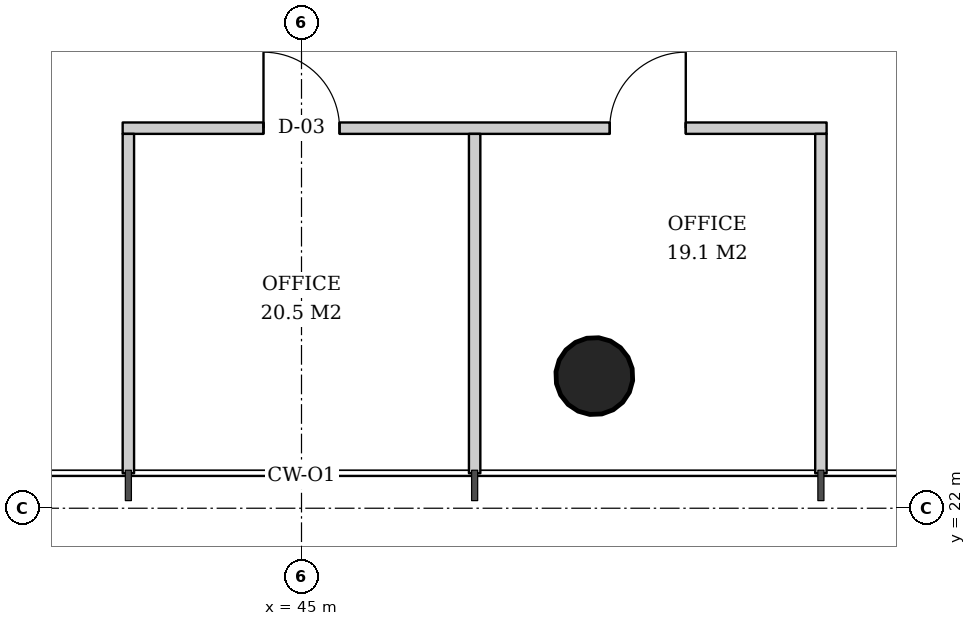
"""IFC4 building model, lengths in metres.
Left out: names, types, materials, properties, quantities, classifications, styles, units other than length and angle.
Written with IfcOpenShell. Run it as: python <this file> out.ifc"""

import sys

from ifc_helpers import new_model, si_unit, direction, frame, frame_2d, origin, origin_2d, place, context, subcontext, project, spatial, rectangle, hollow_circle, extrude, element, fill, save


model = new_model("IFC4")
c1 = context("Model", 3, precision=1e-05, world=origin(), true_north=direction((0.0, 1.0)))
c2 = subcontext(c1, "Body", "Model", "MODEL_VIEW")
j1 = project(units=[si_unit("LENGTHUNIT", "METRE"), si_unit("PLANEANGLEUNIT", "RADIAN")], contexts=[c1])
p1 = place(None, origin())
s1 = spatial("IfcSite", under=j1, at=p1, CompositionType="ELEMENT")
p2 = place(p1, origin())
s2 = spatial("IfcBuilding", under=s1, at=p2, CompositionType="ELEMENT")
p3 = place(p2, frame((0.0, 0.0, 74.2)))
s3 = spatial("IfcBuildingStorey", under=s2, at=p3, CompositionType="ELEMENT", Elevation=74.2)
p4 = place(p3, frame((48.86, 23.7, 0.0), z_axis=(-0.006421252497, 0.031977837436, 0.999467951177), x_axis=(-0.980428942348, -0.196873281596, 0.0)))
e1 = element("IfcColumn", 1, at=p4, inside=s3, PredefinedType="COLUMN", context=c2, shape_type="SweptSolid", body=[
    extrude(hollow_circle(Radius=0.508, WallThickness=0.04, at=origin_2d()), origin(), (0.0, 0.0, 1.0), 3.802),
])
p5 = place(p3, frame((42.647, 27.0, 0.0), z_axis=(0.0, 0.0, 1.0), x_axis=(1.0, 0.0, 0.0)))
e2 = element("IfcWall", 2, at=p5, inside=s3, PredefinedType="PARTITIONING", context=c2, shape_type="SweptSolid", body=[
    extrude(rectangle(XDim=9.261, YDim=0.15, at=frame_2d((4.631, 0.0))), origin(), (0.0, 0.0, 1.0), 2.85),
])
p6 = place(p5, frame((1.853, 0.0, 0.0)))
e3 = element("IfcOpeningElement", 3, at=p6, cuts=e2, PredefinedType="OPENING", context=c2, shape_type="SweptSolid", body=[
    extrude(rectangle(XDim=1.0, YDim=2.1, at=frame_2d((0.5, 1.05))), frame((0.0, 0.085, 0.0), z_axis=(0.0, -1.0, 0.0), x_axis=(1.0, 0.0, 0.0)), (0.0, 0.0, 1.0), 0.17),
])
p7 = place(p5, frame((6.408, 0.0, 0.0)))
e4 = element("IfcOpeningElement", 4, at=p7, cuts=e2, PredefinedType="OPENING", context=c2, shape_type="SweptSolid", body=[
    extrude(rectangle(XDim=1.0, YDim=2.1, at=frame_2d((0.5, 1.05))), frame((0.0, 0.085, 0.0), z_axis=(0.0, -1.0, 0.0), x_axis=(1.0, 0.0, 0.0)), (0.0, 0.0, 1.0), 0.17),
])
for number, where, z_axis, x_axis in (
    (5, (42.722, 26.925, 0.0), (0.0, 0.0, 1.0), (0.0, -1.0, 0.0)),
    (6, (47.278, 26.925, 0.0), (0.0, 0.0, 1.0), (0.0, -1.0, 0.0)),
    (7, (51.833, 26.925, 0.0), (0.0, 0.0, 1.0), (0.0, -1.0, 0.0)),
):
    element("IfcWall", number, at=place(p3, frame(where, z_axis=z_axis, x_axis=x_axis)), inside=s3, PredefinedType="PARTITIONING", context=c2, shape_type="SweptSolid", body=[
        extrude(rectangle(XDim=4.465, YDim=0.15, at=frame_2d((2.232, 0.0))), origin(), (0.0, 0.0, 1.0), 3.02),
    ])
p8 = place(p6, origin())
e8 = element("IfcDoor", 8, at=p8, inside=s3, OperationType="SINGLE_SWING_LEFT", PredefinedType="DOOR", context=c2, shape_type="SweptSolid", body=[
    extrude(rectangle(XDim=1.0, YDim=2.1, at=frame_2d((0.5, 1.05))), frame((0.0, 0.025, 0.0), z_axis=(0.0, -1.0, 0.0), x_axis=(1.0, 0.0, 0.0)), (0.0, 0.0, 1.0), 0.05),
])
fill(e3, e8)
p9 = place(p7, origin())
e9 = element("IfcDoor", 9, at=p9, inside=s3, OperationType="SINGLE_SWING_RIGHT", PredefinedType="DOOR", context=c2, shape_type="SweptSolid", body=[
    extrude(rectangle(XDim=1.0, YDim=2.1, at=frame_2d((0.5, 1.05))), frame((0.0, 0.025, 0.0), z_axis=(0.0, -1.0, 0.0), x_axis=(1.0, 0.0, 0.0)), (0.0, 0.0, 1.0), 0.05),
])
fill(e4, e9)
save(model, sys.argv[1])
